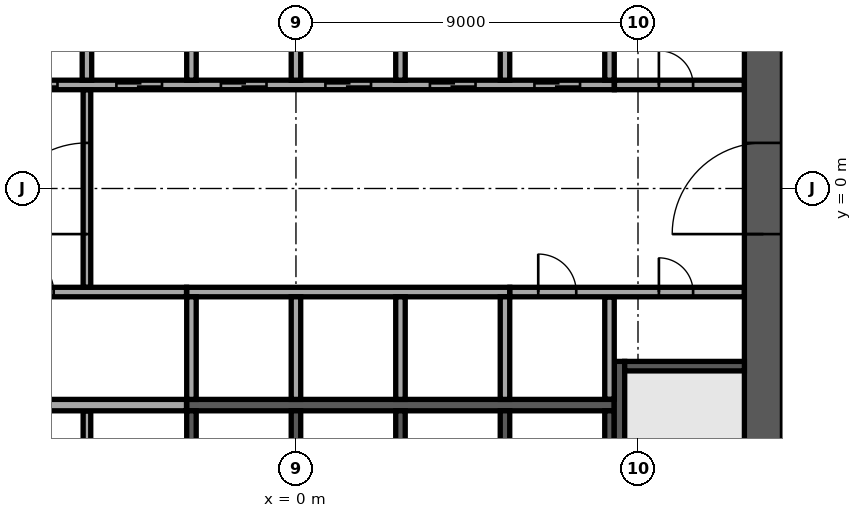
"""IFC4 building model, lengths in metres.
Left out: names, types, materials, properties, quantities, classifications, styles, units other than length and angle.
Written with IfcOpenShell. Run it as: python <this file> out.ifc"""

import sys

from ifc_helpers import new_model, si_unit, direction, frame, frame_2d, origin, place, context, subcontext, project, spatial, rectangle, extrude, element, fill, save


model = new_model("IFC4")
c1 = context("Model", 3, precision=1e-05, world=origin(), true_north=direction((0.0, 1.0)))
c2 = subcontext(c1, "Body", "Model", "MODEL_VIEW")
j1 = project(units=[si_unit("LENGTHUNIT", "METRE"), si_unit("PLANEANGLEUNIT", "RADIAN")], contexts=[c1])
p1 = place(None, origin())
s1 = spatial("IfcSite", under=j1, at=p1, CompositionType="ELEMENT")
p2 = place(p1, origin())
s2 = spatial("IfcBuilding", under=s1, at=p2, CompositionType="ELEMENT")
p3 = place(p2, frame((0.0, 0.0, 155.7)))
s3 = spatial("IfcBuildingStorey", under=s2, at=p3, CompositionType="ELEMENT", Elevation=155.7)
p4 = place(p3, frame((12.3, -11.8, 0.0), z_axis=(0.0, 0.0, 1.0), x_axis=(0.0, 1.0, 0.0)))
e1 = element("IfcWall", 1, at=p4, inside=s3, PredefinedType="SHEAR", context=c2, shape_type="SweptSolid", body=[
    extrude(rectangle(XDim=23.6, YDim=1.0, at=frame_2d((11.8, 0.0))), origin(), (0.0, 0.0, 1.0), 3.6),
])
p5 = place(p4, frame((10.6, 0.0, 0.0)))
e2 = element("IfcOpeningElement", 2, at=p5, cuts=e1, PredefinedType="OPENING", context=c2, shape_type="SweptSolid", body=[
    extrude(rectangle(XDim=2.4, YDim=2.4, at=frame_2d((1.2, 1.2))), frame((0.0, 0.51, 0.0), z_axis=(0.0, -1.0, 0.0), x_axis=(1.0, 0.0, 0.0)), (0.0, 0.0, 1.0), 1.02),
])
p6 = place(p3, frame((-2.875, -5.7, 0.0), z_axis=(0.0, 0.0, 1.0), x_axis=(1.0, 0.0, 0.0)))
e3 = element("IfcWall", 3, at=p6, inside=s3, PredefinedType="SOLIDWALL", context=c2, shape_type="SweptSolid", body=[
    extrude(rectangle(XDim=11.25, YDim=0.3, at=frame_2d((5.625, 0.0))), origin(), (0.0, 0.0, 1.0), 3.6),
])
p7 = place(p3, frame((-8.375, 2.725, 0.0), z_axis=(0.0, 0.0, 1.0), x_axis=(1.0, 0.0, 0.0)))
e4 = element("IfcWall", 4, at=p7, inside=s3, PredefinedType="SOLIDWALL", context=c2, shape_type="SweptSolid", body=[
    extrude(rectangle(XDim=16.75, YDim=0.25, at=frame_2d((8.375, 0.0))), origin(), (0.0, 0.0, 1.0), 3.6),
])
p8 = place(p7, frame((0.9, 0.0, 0.0)))
e5 = element("IfcOpeningElement", 5, at=p8, cuts=e4, PredefinedType="OPENING", context=c2, shape_type="SweptSolid", body=[
    extrude(rectangle(XDim=1.2, YDim=2.1, at=frame_2d((0.6, 1.05))), frame((0.0, 0.135, 0.0), z_axis=(0.0, -1.0, 0.0), x_axis=(1.0, 0.0, 0.0)), (0.0, 0.0, 1.0), 0.27),
])
p9 = place(p7, frame((3.65, 0.0, 0.0)))
e6 = element("IfcOpeningElement", 6, at=p9, cuts=e4, PredefinedType="OPENING", context=c2, shape_type="SweptSolid", body=[
    extrude(rectangle(XDim=1.2, YDim=2.1, at=frame_2d((0.6, 1.05))), frame((0.0, 0.135, 0.0), z_axis=(0.0, -1.0, 0.0), x_axis=(1.0, 0.0, 0.0)), (0.0, 0.0, 1.0), 0.27),
])
p10 = place(p7, frame((6.4, 0.0, 0.0)))
e7 = element("IfcOpeningElement", 7, at=p10, cuts=e4, PredefinedType="OPENING", context=c2, shape_type="SweptSolid", body=[
    extrude(rectangle(XDim=1.2, YDim=2.1, at=frame_2d((0.6, 1.05))), frame((0.0, 0.135, 0.0), z_axis=(0.0, -1.0, 0.0), x_axis=(1.0, 0.0, 0.0)), (0.0, 0.0, 1.0), 0.27),
])
p11 = place(p7, frame((9.15, 0.0, 0.0)))
e8 = element("IfcOpeningElement", 8, at=p11, cuts=e4, PredefinedType="OPENING", context=c2, shape_type="SweptSolid", body=[
    extrude(rectangle(XDim=1.2, YDim=2.1, at=frame_2d((0.6, 1.05))), frame((0.0, 0.135, 0.0), z_axis=(0.0, -1.0, 0.0), x_axis=(1.0, 0.0, 0.0)), (0.0, 0.0, 1.0), 0.27),
])
p12 = place(p7, frame((11.9, 0.0, 0.0)))
e9 = element("IfcOpeningElement", 9, at=p12, cuts=e4, PredefinedType="OPENING", context=c2, shape_type="SweptSolid", body=[
    extrude(rectangle(XDim=1.2, YDim=2.1, at=frame_2d((0.6, 1.05))), frame((0.0, 0.135, 0.0), z_axis=(0.0, -1.0, 0.0), x_axis=(1.0, 0.0, 0.0)), (0.0, 0.0, 1.0), 0.27),
])
p13 = place(p7, frame((14.65, 0.0, 0.0)))
e10 = element("IfcOpeningElement", 10, at=p13, cuts=e4, PredefinedType="OPENING", context=c2, shape_type="SweptSolid", body=[
    extrude(rectangle(XDim=1.2, YDim=2.1, at=frame_2d((0.6, 1.05))), frame((0.0, 0.135, 0.0), z_axis=(0.0, -1.0, 0.0), x_axis=(1.0, 0.0, 0.0)), (0.0, 0.0, 1.0), 0.27),
])
for number, where, z_axis, x_axis in (
    (11, (-5.5, 2.85, 0.0), (0.0, 0.0, 1.0), (0.0, 1.0, 0.0)),
    (12, (-2.75, 2.85, 0.0), (0.0, 0.0, 1.0), (0.0, 1.0, 0.0)),
    (13, (0.0, 2.85, 0.0), (0.0, 0.0, 1.0), (0.0, 1.0, 0.0)),
    (14, (2.75, 2.85, 0.0), (0.0, 0.0, 1.0), (0.0, 1.0, 0.0)),
    (15, (5.5, 2.85, 0.0), (0.0, 0.0, 1.0), (0.0, 1.0, 0.0)),
    (16, (8.25, 2.85, 0.0), (0.0, 0.0, 1.0), (0.0, 1.0, 0.0)),
):
    element("IfcWall", number, at=place(p3, frame(where, z_axis=z_axis, x_axis=x_axis)), inside=s3, PredefinedType="SOLIDWALL", context=c2, shape_type="SweptSolid", body=[
        extrude(rectangle(XDim=2.7, YDim=0.25, at=frame_2d((1.35, 0.0))), origin(), (0.0, 0.0, 1.0), 3.6),
    ])
p14 = place(p3, frame((-2.875, -2.725, 0.0), z_axis=(0.0, 0.0, 1.0), x_axis=(1.0, 0.0, 0.0)))
e17 = element("IfcWall", 17, at=p14, inside=s3, PredefinedType="SOLIDWALL", context=c2, shape_type="SweptSolid", body=[
    extrude(rectangle(XDim=8.5, YDim=0.25, at=frame_2d((4.25, 0.0))), origin(), (0.0, 0.0, 1.0), 3.6),
])
for number, where, z_axis, x_axis in (
    (18, (-2.75, -5.55, 0.0), (0.0, 0.0, 1.0), (0.0, 1.0, 0.0)),
    (19, (0.0, -5.55, 0.0), (0.0, 0.0, 1.0), (0.0, 1.0, 0.0)),
    (20, (2.75, -5.55, 0.0), (0.0, 0.0, 1.0), (0.0, 1.0, 0.0)),
    (21, (5.5, -5.55, 0.0), (0.0, 0.0, 1.0), (0.0, 1.0, 0.0)),
    (22, (-2.75, -8.55, 0.0), (0.0, 0.0, 1.0), (0.0, 1.0, 0.0)),
    (23, (0.0, -8.55, 0.0), (0.0, 0.0, 1.0), (0.0, 1.0, 0.0)),
    (24, (2.75, -8.55, 0.0), (0.0, 0.0, 1.0), (0.0, 1.0, 0.0)),
    (25, (5.5, -8.55, 0.0), (0.0, 0.0, 1.0), (0.0, 1.0, 0.0)),
    (26, (8.25, -8.55, 0.0), (0.0, 0.0, 1.0), (0.0, 1.0, 0.0)),
):
    element("IfcWall", number, at=place(p3, frame(where, z_axis=z_axis, x_axis=x_axis)), inside=s3, PredefinedType="SOLIDWALL", context=c2, shape_type="SweptSolid", body=[
        extrude(rectangle(XDim=2.7, YDim=0.25, at=frame_2d((1.35, 0.0))), origin(), (0.0, 0.0, 1.0), 3.6),
    ])
p15 = place(p3, frame((8.512, -4.55, 0.0), z_axis=(0.0, 0.0, 1.0), x_axis=(0.0, -1.0, 0.0)))
e27 = element("IfcWall", 27, at=p15, inside=s3, PredefinedType="SOLIDWALL", context=c2, shape_type="SweptSolid", body=[
    extrude(rectangle(XDim=7.25, YDim=0.275, at=frame_2d((3.625, 0.0))), origin(), (0.0, 0.0, 1.0), 3.6),
])
p16 = place(p15, frame((6.0, 0.0, 0.0)))
e28 = element("IfcOpeningElement", 28, at=p16, cuts=e27, PredefinedType="OPENING", context=c2, shape_type="SweptSolid", body=[
    extrude(rectangle(XDim=1.0, YDim=2.1, at=frame_2d((0.5, 1.05))), frame((0.0, 0.147, 0.0), z_axis=(0.0, -1.0, 0.0), x_axis=(1.0, 0.0, 0.0)), (0.0, 0.0, 1.0), 0.295),
])
p17 = place(p3, frame((8.65, -4.675, 0.0), z_axis=(0.0, 0.0, 1.0), x_axis=(1.0, 0.0, 0.0)))
e29 = element("IfcWall", 29, at=p17, inside=s3, PredefinedType="SOLIDWALL", context=c2, shape_type="SweptSolid", body=[
    extrude(rectangle(XDim=3.15, YDim=0.25, at=frame_2d((1.575, 0.0))), origin(), (0.0, 0.0, 1.0), 3.6),
])
p18 = place(p3, frame((-5.5, -8.545, 0.0), z_axis=(0.0, 0.0, 1.0), x_axis=(0.0, 1.0, 0.0)))
e30 = element("IfcWall", 30, at=p18, inside=s3, PredefinedType="PARTITIONING", context=c2, shape_type="SweptSolid", body=[
    extrude(rectangle(XDim=2.69, YDim=0.2, at=frame_2d((1.345, 0.0))), origin(), (0.0, 0.0, 1.0), 3.6),
])
p19 = place(p3, frame((-8.35, -5.7, 0.0), z_axis=(0.0, 0.0, 1.0), x_axis=(1.0, 0.0, 0.0)))
e31 = element("IfcWall", 31, at=p19, inside=s3, PredefinedType="PARTITIONING", context=c2, shape_type="SweptSolid", body=[
    extrude(rectangle(XDim=5.47, YDim=0.3, at=frame_2d((2.735, 0.0))), origin(), (0.0, 0.0, 1.0), 3.6),
])
p20 = place(p3, frame((8.25, -5.545, 0.0), z_axis=(0.0, 0.0, 1.0), x_axis=(0.0, 1.0, 0.0)))
e32 = element("IfcWall", 32, at=p20, inside=s3, PredefinedType="PARTITIONING", context=c2, shape_type="SweptSolid", body=[
    extrude(rectangle(XDim=2.69, YDim=0.25, at=frame_2d((1.345, 0.0))), origin(), (0.0, 0.0, 1.0), 3.6),
])
p21 = place(p3, frame((-11.795, -2.725, 0.0), z_axis=(0.0, 0.0, 1.0), x_axis=(1.0, 0.0, 0.0)))
e33 = element("IfcWall", 33, at=p21, inside=s3, PredefinedType="PARTITIONING", context=c2, shape_type="SweptSolid", body=[
    extrude(rectangle(XDim=8.915, YDim=0.25, at=frame_2d((4.458, 0.0))), origin(), (0.0, 0.0, 1.0), 3.6),
])
p22 = place(p21, frame((1.295, 0.0, 0.0)))
e34 = element("IfcOpeningElement", 34, at=p22, cuts=e33, PredefinedType="OPENING", context=c2, shape_type="SweptSolid", body=[
    extrude(rectangle(XDim=1.0, YDim=2.1, at=frame_2d((0.5, 1.05))), frame((0.0, 0.135, 0.0), z_axis=(0.0, -1.0, 0.0), x_axis=(1.0, 0.0, 0.0)), (0.0, 0.0, 1.0), 0.27),
])
p23 = place(p21, frame((4.42, 0.0, 0.0)))
e35 = element("IfcOpeningElement", 35, at=p23, cuts=e33, PredefinedType="OPENING", context=c2, shape_type="SweptSolid", body=[
    extrude(rectangle(XDim=1.0, YDim=2.1, at=frame_2d((0.5, 1.05))), frame((0.0, 0.135, 0.0), z_axis=(0.0, -1.0, 0.0), x_axis=(1.0, 0.0, 0.0)), (0.0, 0.0, 1.0), 0.27),
])
p24 = place(p3, frame((5.63, -2.725, 0.0), z_axis=(0.0, 0.0, 1.0), x_axis=(1.0, 0.0, 0.0)))
e36 = element("IfcWall", 36, at=p24, inside=s3, PredefinedType="PARTITIONING", context=c2, shape_type="SweptSolid", body=[
    extrude(rectangle(XDim=6.165, YDim=0.25, at=frame_2d((3.083, 0.0))), origin(), (0.0, 0.0, 1.0), 3.6),
])
p25 = place(p24, frame((0.745, 0.0, 0.0)))
e37 = element("IfcOpeningElement", 37, at=p25, cuts=e36, PredefinedType="OPENING", context=c2, shape_type="SweptSolid", body=[
    extrude(rectangle(XDim=1.0, YDim=2.1, at=frame_2d((0.5, 1.05))), frame((0.0, 0.135, 0.0), z_axis=(0.0, -1.0, 0.0), x_axis=(1.0, 0.0, 0.0)), (0.0, 0.0, 1.0), 0.27),
])
p26 = place(p24, frame((3.92, 0.0, 0.0)))
e38 = element("IfcOpeningElement", 38, at=p26, cuts=e36, PredefinedType="OPENING", context=c2, shape_type="SweptSolid", body=[
    extrude(rectangle(XDim=0.9, YDim=2.1, at=frame_2d((0.45, 1.05))), frame((0.0, 0.135, 0.0), z_axis=(0.0, -1.0, 0.0), x_axis=(1.0, 0.0, 0.0)), (0.0, 0.0, 1.0), 0.27),
])
p27 = place(p3, frame((-5.5, -2.595, 0.0), z_axis=(0.0, 0.0, 1.0), x_axis=(0.0, 1.0, 0.0)))
e39 = element("IfcWall", 39, at=p27, inside=s3, PredefinedType="PARTITIONING", context=c2, shape_type="SweptSolid", body=[
    extrude(rectangle(XDim=5.19, YDim=0.2, at=frame_2d((2.595, 0.0))), origin(), (0.0, 0.0, 1.0), 3.6),
])
p28 = place(p27, frame((1.395, 0.0, 0.0)))
e40 = element("IfcOpeningElement", 40, at=p28, cuts=e39, PredefinedType="OPENING", context=c2, shape_type="SweptSolid", body=[
    extrude(rectangle(XDim=2.4, YDim=2.4, at=frame_2d((1.2, 1.2))), frame((0.0, 0.11, 0.0), z_axis=(0.0, -1.0, 0.0), x_axis=(1.0, 0.0, 0.0)), (0.0, 0.0, 1.0), 0.22),
])
p29 = place(p3, frame((8.38, 2.725, 0.0), z_axis=(0.0, 0.0, 1.0), x_axis=(1.0, 0.0, 0.0)))
e41 = element("IfcWall", 41, at=p29, inside=s3, PredefinedType="PARTITIONING", context=c2, shape_type="SweptSolid", body=[
    extrude(rectangle(XDim=3.415, YDim=0.25, at=frame_2d((1.708, 0.0))), origin(), (0.0, 0.0, 1.0), 3.6),
])
p30 = place(p29, frame((1.17, 0.0, 0.0)))
e42 = element("IfcOpeningElement", 42, at=p30, cuts=e41, PredefinedType="OPENING", context=c2, shape_type="SweptSolid", body=[
    extrude(rectangle(XDim=0.9, YDim=2.1, at=frame_2d((0.45, 1.05))), frame((0.0, 0.135, 0.0), z_axis=(0.0, -1.0, 0.0), x_axis=(1.0, 0.0, 0.0)), (0.0, 0.0, 1.0), 0.27),
])
p31 = place(p3, frame((-4.376, -25.496, 0.0), z_axis=(0.0, 0.0, 1.0), x_axis=(0.838659454634, 0.544656147631, 0.0)))
e43 = element("IfcWall", 43, at=p31, inside=s3, PredefinedType="PARTITIONING", context=c2, shape_type="SweptSolid", body=[
    extrude(rectangle(XDim=35.188, YDim=0.15, at=frame_2d((17.594, 0.0))), origin(), (0.0, 0.0, 1.0), 3.15),
])
p32 = place(p31, frame((2.55, 0.0, 0.0)))
e44 = element("IfcOpeningElement", 44, at=p32, cuts=e43, PredefinedType="OPENING", context=c2, shape_type="SweptSolid", body=[
    extrude(rectangle(XDim=1.0, YDim=2.1, at=frame_2d((0.5, 1.05))), frame((0.0, 0.085, 0.0), z_axis=(0.0, -1.0, 0.0), x_axis=(1.0, 0.0, 0.0)), (0.0, 0.0, 1.0), 0.17),
])
p33 = place(p31, frame((12.126, 0.0, 0.0)))
e45 = element("IfcOpeningElement", 45, at=p33, cuts=e43, PredefinedType="OPENING", context=c2, shape_type="SweptSolid", body=[
    extrude(rectangle(XDim=1.0, YDim=2.1, at=frame_2d((0.5, 1.05))), frame((0.0, 0.085, 0.0), z_axis=(0.0, -1.0, 0.0), x_axis=(1.0, 0.0, 0.0)), (0.0, 0.0, 1.0), 0.17),
])
p34 = place(p31, frame((25.759, 0.0, 0.0)))
e46 = element("IfcOpeningElement", 46, at=p34, cuts=e43, PredefinedType="OPENING", context=c2, shape_type="SweptSolid", body=[
    extrude(rectangle(XDim=1.0, YDim=2.1, at=frame_2d((0.5, 1.05))), frame((0.0, 0.085, 0.0), z_axis=(0.0, -1.0, 0.0), x_axis=(1.0, 0.0, 0.0)), (0.0, 0.0, 1.0), 0.17),
])
p35 = place(p3, frame((10.958, 22.783, 0.0), z_axis=(0.0, 0.0, 1.0), x_axis=(0.544655201926, -0.838660068809, 0.0)))
e47 = element("IfcWall", 47, at=p35, inside=s3, PredefinedType="PARTITIONING", context=c2, shape_type="SweptSolid", body=[
    extrude(rectangle(XDim=26.354, YDim=0.15, at=frame_2d((13.177, 0.0))), origin(), (0.0, 0.0, 1.0), 3.15),
])
p36 = place(p35, frame((13.46, 0.0, 0.0)))
e48 = element("IfcOpeningElement", 48, at=p36, cuts=e47, PredefinedType="OPENING", context=c2, shape_type="SweptSolid", body=[
    extrude(rectangle(XDim=1.0, YDim=2.1, at=frame_2d((0.5, 1.05))), frame((0.0, 0.085, 0.0), z_axis=(0.0, -1.0, 0.0), x_axis=(1.0, 0.0, 0.0)), (0.0, 0.0, 1.0), 0.17),
])
p37 = place(p5, origin())
e49 = element("IfcDoor", 49, at=p37, inside=s3, OperationType="SINGLE_SWING_LEFT", PredefinedType="DOOR", context=c2, shape_type="SweptSolid", body=[
    extrude(rectangle(XDim=2.4, YDim=2.4, at=frame_2d((1.2, 1.2))), frame((0.0, 0.025, 0.0), z_axis=(0.0, -1.0, 0.0), x_axis=(1.0, 0.0, 0.0)), (0.0, 0.0, 1.0), 0.05),
])
fill(e2, e49)
p38 = place(p8, origin())
e50 = element("IfcDoor", 50, at=p38, inside=s3, OperationType="DOUBLE_DOOR_SLIDING", PredefinedType="DOOR", context=c2, shape_type="SweptSolid", body=[
    extrude(rectangle(XDim=1.2, YDim=2.1, at=frame_2d((0.6, 1.05))), frame((0.0, 0.025, 0.0), z_axis=(0.0, -1.0, 0.0), x_axis=(1.0, 0.0, 0.0)), (0.0, 0.0, 1.0), 0.05),
])
fill(e5, e50)
p39 = place(p9, origin())
e51 = element("IfcDoor", 51, at=p39, inside=s3, OperationType="DOUBLE_DOOR_SLIDING", PredefinedType="DOOR", context=c2, shape_type="SweptSolid", body=[
    extrude(rectangle(XDim=1.2, YDim=2.1, at=frame_2d((0.6, 1.05))), frame((0.0, 0.025, 0.0), z_axis=(0.0, -1.0, 0.0), x_axis=(1.0, 0.0, 0.0)), (0.0, 0.0, 1.0), 0.05),
])
fill(e6, e51)
p40 = place(p10, origin())
e52 = element("IfcDoor", 52, at=p40, inside=s3, OperationType="DOUBLE_DOOR_SLIDING", PredefinedType="DOOR", context=c2, shape_type="SweptSolid", body=[
    extrude(rectangle(XDim=1.2, YDim=2.1, at=frame_2d((0.6, 1.05))), frame((0.0, 0.025, 0.0), z_axis=(0.0, -1.0, 0.0), x_axis=(1.0, 0.0, 0.0)), (0.0, 0.0, 1.0), 0.05),
])
fill(e7, e52)
p41 = place(p11, origin())
e53 = element("IfcDoor", 53, at=p41, inside=s3, OperationType="DOUBLE_DOOR_SLIDING", PredefinedType="DOOR", context=c2, shape_type="SweptSolid", body=[
    extrude(rectangle(XDim=1.2, YDim=2.1, at=frame_2d((0.6, 1.05))), frame((0.0, 0.025, 0.0), z_axis=(0.0, -1.0, 0.0), x_axis=(1.0, 0.0, 0.0)), (0.0, 0.0, 1.0), 0.05),
])
fill(e8, e53)
p42 = place(p12, origin())
e54 = element("IfcDoor", 54, at=p42, inside=s3, OperationType="DOUBLE_DOOR_SLIDING", PredefinedType="DOOR", context=c2, shape_type="SweptSolid", body=[
    extrude(rectangle(XDim=1.2, YDim=2.1, at=frame_2d((0.6, 1.05))), frame((0.0, 0.025, 0.0), z_axis=(0.0, -1.0, 0.0), x_axis=(1.0, 0.0, 0.0)), (0.0, 0.0, 1.0), 0.05),
])
fill(e9, e54)
p43 = place(p13, origin())
e55 = element("IfcDoor", 55, at=p43, inside=s3, OperationType="DOUBLE_DOOR_SLIDING", PredefinedType="DOOR", context=c2, shape_type="SweptSolid", body=[
    extrude(rectangle(XDim=1.2, YDim=2.1, at=frame_2d((0.6, 1.05))), frame((0.0, 0.025, 0.0), z_axis=(0.0, -1.0, 0.0), x_axis=(1.0, 0.0, 0.0)), (0.0, 0.0, 1.0), 0.05),
])
fill(e10, e55)
p44 = place(p25, origin())
e56 = element("IfcDoor", 56, at=p44, inside=s3, OperationType="SINGLE_SWING_LEFT", PredefinedType="DOOR", context=c2, shape_type="SweptSolid", body=[
    extrude(rectangle(XDim=1.0, YDim=2.1, at=frame_2d((0.5, 1.05))), frame((0.0, 0.025, 0.0), z_axis=(0.0, -1.0, 0.0), x_axis=(1.0, 0.0, 0.0)), (0.0, 0.0, 1.0), 0.05),
])
fill(e37, e56)
p45 = place(p30, origin())
e57 = element("IfcDoor", 57, at=p45, inside=s3, OperationType="SINGLE_SWING_LEFT", PredefinedType="DOOR", context=c2, shape_type="SweptSolid", body=[
    extrude(rectangle(XDim=0.9, YDim=2.1, at=frame_2d((0.45, 1.05))), frame((0.0, 0.025, 0.0), z_axis=(0.0, -1.0, 0.0), x_axis=(1.0, 0.0, 0.0)), (0.0, 0.0, 1.0), 0.05),
])
fill(e42, e57)
p46 = place(p26, origin())
e58 = element("IfcDoor", 58, at=p46, inside=s3, OperationType="SINGLE_SWING_LEFT", PredefinedType="DOOR", context=c2, shape_type="SweptSolid", body=[
    extrude(rectangle(XDim=0.9, YDim=2.1, at=frame_2d((0.45, 1.05))), frame((0.0, 0.025, 0.0), z_axis=(0.0, -1.0, 0.0), x_axis=(1.0, 0.0, 0.0)), (0.0, 0.0, 1.0), 0.05),
])
fill(e38, e58)
p47 = place(p23, origin())
e59 = element("IfcDoor", 59, at=p47, inside=s3, OperationType="SINGLE_SWING_LEFT", PredefinedType="DOOR", context=c2, shape_type="SweptSolid", body=[
    extrude(rectangle(XDim=1.0, YDim=2.1, at=frame_2d((0.5, 1.05))), frame((0.0, 0.025, 0.0), z_axis=(0.0, -1.0, 0.0), x_axis=(1.0, 0.0, 0.0)), (0.0, 0.0, 1.0), 0.05),
])
fill(e35, e59)
p48 = place(p28, origin())
e60 = element("IfcDoor", 60, at=p48, inside=s3, OperationType="SINGLE_SWING_LEFT", PredefinedType="DOOR", context=c2, shape_type="SweptSolid", body=[
    extrude(rectangle(XDim=2.4, YDim=2.4, at=frame_2d((1.2, 1.2))), frame((0.0, 0.025, 0.0), z_axis=(0.0, -1.0, 0.0), x_axis=(1.0, 0.0, 0.0)), (0.0, 0.0, 1.0), 0.05),
])
fill(e40, e60)
save(model, sys.argv[1])
